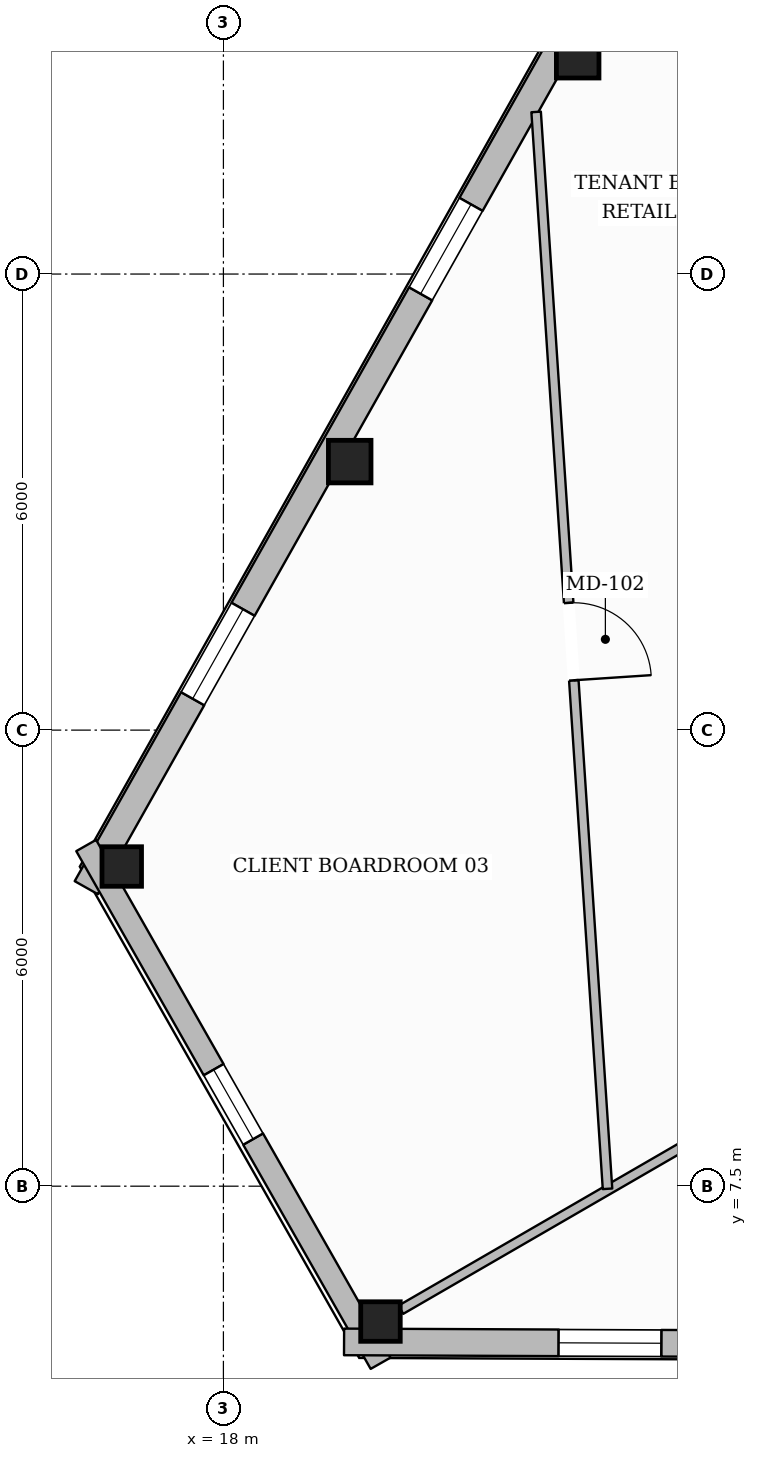
"""IFC4 building model, lengths in metres.
Left out: names, types, materials, properties, quantities, classifications, styles, units other than length and angle.
Written with IfcOpenShell. Run it as: python <this file> out.ifc"""

import sys

from ifc_helpers import new_model, si_unit, direction, frame, frame_2d, origin, origin_2d, place, context, subcontext, project, spatial, rectangle, hollow_rectangle, extrude, element, fill, save


model = new_model("IFC4")
c1 = context("Model", 3, precision=1e-05, world=origin(), true_north=direction((0.0, 1.0)))
c2 = subcontext(c1, "Body", "Model", "MODEL_VIEW")
j1 = project(units=[si_unit("LENGTHUNIT", "METRE"), si_unit("PLANEANGLEUNIT", "RADIAN")], contexts=[c1])
p1 = place(None, origin())
s1 = spatial("IfcSite", under=j1, at=p1, CompositionType="ELEMENT")
p2 = place(p1, origin())
s2 = spatial("IfcBuilding", under=s1, at=p2, CompositionType="ELEMENT")
p3 = place(p2, frame((0.0, 0.0, 239.5)))
s3 = spatial("IfcBuildingStorey", under=s2, at=p3, CompositionType="ELEMENT", Elevation=239.5)
for number, where, z_axis, x_axis in (
    (1, (22.661, 22.359, 0.0), (0.0, 0.0, 1.0), (1.0, 0.0, 0.0)),
    (2, (19.662, 17.032, 0.0), (0.0, 0.0, 1.0), (1.0, 0.0, 0.0)),
):
    element("IfcColumn", number, at=place(p3, frame(where, z_axis=z_axis, x_axis=x_axis)), inside=s3, PredefinedType="COLUMN", context=c2, shape_type="SweptSolid", body=[
        extrude(hollow_rectangle(XDim=0.56, YDim=0.56, WallThickness=0.025, at=origin_2d()), origin(), (0.0, 0.0, 1.0), 3.61),
    ])
for number, where, z_axis, x_axis in (
    (3, (16.663, 11.706, 0.0), (0.0, 0.0, 1.0), (1.0, 0.0, 0.0)),
    (4, (20.066, 5.719, 0.0), (0.0, 0.0, 1.0), (1.0, 0.0, 0.0)),
):
    element("IfcColumn", number, at=place(p3, frame(where, z_axis=z_axis, x_axis=x_axis)), inside=s3, PredefinedType="COLUMN", context=c2, shape_type="SweptSolid", body=[
        extrude(hollow_rectangle(XDim=0.52, YDim=0.52, WallThickness=0.024, at=origin_2d()), origin(), (0.0, 0.0, 1.0), 3.61),
    ])
p4 = place(p3, frame((16.196, 11.427, 0.0), z_axis=(0.0, 0.0, 1.0), x_axis=(0.490622807514, 0.871372056442, 0.0)))
e5 = element("IfcWall", 5, at=p4, inside=s3, PredefinedType="STANDARD", context=c2, shape_type="SweptSolid", body=[
    extrude(rectangle(XDim=37.632, YDim=0.35, at=frame_2d((18.816, 0.0))), origin(), (0.0, 0.0, 1.0), 3.196),
])
p5 = place(p4, frame((27.624, 0.0, 0.0)))
e6 = element("IfcOpeningElement", 6, at=p5, cuts=e5, PredefinedType="OPENING", context=c2, shape_type="SweptSolid", body=[
    extrude(rectangle(XDim=1.0, YDim=2.2, at=frame_2d((0.5, 1.1))), frame((0.0, 0.185, 0.0), z_axis=(0.0, -1.0, 0.0), x_axis=(1.0, 0.0, 0.0)), (0.0, 0.0, 1.0), 0.37),
])
p6 = place(p4, frame((33.418, 0.0, 0.65)))
e7 = element("IfcOpeningElement", 7, at=p6, cuts=e5, PredefinedType="OPENING", context=c2, shape_type="SweptSolid", body=[
    extrude(rectangle(XDim=1.35, YDim=1.75, at=frame_2d((0.675, 0.875))), frame((0.0, 0.185, 0.0), z_axis=(0.0, -1.0, 0.0), x_axis=(1.0, 0.0, 0.0)), (0.0, 0.0, 1.0), 0.37),
])
p7 = place(p4, frame((21.192, 0.0, 0.65)))
e8 = element("IfcOpeningElement", 8, at=p7, cuts=e5, PredefinedType="OPENING", context=c2, shape_type="SweptSolid", body=[
    extrude(rectangle(XDim=1.35, YDim=1.75, at=frame_2d((0.675, 0.875))), frame((0.0, 0.185, 0.0), z_axis=(0.0, -1.0, 0.0), x_axis=(1.0, 0.0, 0.0)), (0.0, 0.0, 1.0), 0.37),
])
p8 = place(p4, frame((8.966, 0.0, 0.65)))
e9 = element("IfcOpeningElement", 9, at=p8, cuts=e5, PredefinedType="OPENING", context=c2, shape_type="SweptSolid", body=[
    extrude(rectangle(XDim=1.35, YDim=1.75, at=frame_2d((0.675, 0.875))), frame((0.0, 0.185, 0.0), z_axis=(0.0, -1.0, 0.0), x_axis=(1.0, 0.0, 0.0)), (0.0, 0.0, 1.0), 0.37),
])
p9 = place(p4, frame((2.853, 0.0, 0.65)))
e10 = element("IfcOpeningElement", 10, at=p9, cuts=e5, PredefinedType="OPENING", context=c2, shape_type="SweptSolid", body=[
    extrude(rectangle(XDim=1.35, YDim=1.75, at=frame_2d((0.675, 0.875))), frame((0.0, 0.185, 0.0), z_axis=(0.0, -1.0, 0.0), x_axis=(1.0, 0.0, 0.0)), (0.0, 0.0, 1.0), 0.37),
])
p10 = place(p3, frame((20.068, 5.17, 0.0), z_axis=(0.0, 0.0, 1.0), x_axis=(-0.494295761475, 0.869293793943, 0.0)))
e11 = element("IfcWall", 11, at=p10, inside=s3, PredefinedType="STANDARD", context=c2, shape_type="SweptSolid", body=[
    extrude(rectangle(XDim=7.836, YDim=0.3, at=frame_2d((3.918, 0.0))), origin(), (0.0, 0.0, 1.0), 3.196),
])
p11 = place(p10, frame((3.393, 0.0, 0.65)))
e12 = element("IfcOpeningElement", 12, at=p11, cuts=e11, PredefinedType="OPENING", context=c2, shape_type="SweptSolid", body=[
    extrude(rectangle(XDim=1.05, YDim=1.7, at=frame_2d((0.525, 0.85))), frame((0.0, 0.16, 0.0), z_axis=(0.0, -1.0, 0.0), x_axis=(1.0, 0.0, 0.0)), (0.0, 0.0, 1.0), 0.32),
])
p12 = place(p3, frame((56.79, 5.294, 0.0), z_axis=(0.0, 0.0, 1.0), x_axis=(-0.999991124913, 0.004213086292, 0.0)))
e13 = element("IfcWall", 13, at=p12, inside=s3, PredefinedType="STANDARD", context=c2, shape_type="SweptSolid", body=[
    extrude(rectangle(XDim=37.203, YDim=0.35, at=frame_2d((18.601, 0.0))), origin(), (0.0, 0.0, 1.0), 3.196),
])
p13 = place(p12, frame((27.302, 0.0, 0.0)))
e14 = element("IfcOpeningElement", 14, at=p13, cuts=e13, PredefinedType="OPENING", context=c2, shape_type="SweptSolid", body=[
    extrude(rectangle(XDim=1.0, YDim=2.2, at=frame_2d((0.5, 1.1))), frame((0.0, 0.185, 0.0), z_axis=(0.0, -1.0, 0.0), x_axis=(1.0, 0.0, 0.0)), (0.0, 0.0, 1.0), 0.37),
])
p14 = place(p12, frame((33.03, 0.0, 0.65)))
e15 = element("IfcOpeningElement", 15, at=p14, cuts=e13, PredefinedType="OPENING", context=c2, shape_type="SweptSolid", body=[
    extrude(rectangle(XDim=1.35, YDim=1.75, at=frame_2d((0.675, 0.875))), frame((0.0, 0.185, 0.0), z_axis=(0.0, -1.0, 0.0), x_axis=(1.0, 0.0, 0.0)), (0.0, 0.0, 1.0), 0.37),
])
p15 = place(p12, frame((20.948, 0.0, 0.65)))
e16 = element("IfcOpeningElement", 16, at=p15, cuts=e13, PredefinedType="OPENING", context=c2, shape_type="SweptSolid", body=[
    extrude(rectangle(XDim=1.35, YDim=1.75, at=frame_2d((0.675, 0.875))), frame((0.0, 0.185, 0.0), z_axis=(0.0, -1.0, 0.0), x_axis=(1.0, 0.0, 0.0)), (0.0, 0.0, 1.0), 0.37),
])
p16 = place(p12, frame((8.868, 0.0, 0.65)))
e17 = element("IfcOpeningElement", 17, at=p16, cuts=e13, PredefinedType="OPENING", context=c2, shape_type="SweptSolid", body=[
    extrude(rectangle(XDim=1.35, YDim=1.75, at=frame_2d((0.675, 0.875))), frame((0.0, 0.185, 0.0), z_axis=(0.0, -1.0, 0.0), x_axis=(1.0, 0.0, 0.0)), (0.0, 0.0, 1.0), 0.37),
])
p17 = place(p12, frame((2.827, 0.0, 0.65)))
e18 = element("IfcOpeningElement", 18, at=p17, cuts=e13, PredefinedType="OPENING", context=c2, shape_type="SweptSolid", body=[
    extrude(rectangle(XDim=1.35, YDim=1.75, at=frame_2d((0.675, 0.875))), frame((0.0, 0.185, 0.0), z_axis=(0.0, -1.0, 0.0), x_axis=(1.0, 0.0, 0.0)), (0.0, 0.0, 1.0), 0.37),
])
p18 = place(p3, frame((26.01, 9.159, 0.0), z_axis=(0.0, 0.0, 1.0), x_axis=(-0.865468767554, -0.500962885241, 0.0)))
e19 = element("IfcWall", 19, at=p18, inside=s3, PredefinedType="PARTITIONING", context=c2, shape_type="SweptSolid", body=[
    extrude(rectangle(XDim=6.557, YDim=0.125, at=frame_2d((3.279, 0.0))), origin(), (0.0, 0.0, 1.0), 3.246),
])
p19 = place(p3, frame((22.114, 21.633, 0.0), z_axis=(0.0, 0.0, 1.0), x_axis=(0.06614923697, -0.997809740606, 0.0)))
e20 = element("IfcWall", 20, at=p19, inside=s3, PredefinedType="PARTITIONING", context=c2, shape_type="SweptSolid", body=[
    extrude(rectangle(XDim=14.198, YDim=0.125, at=frame_2d((7.099, 0.0))), origin(), (0.0, 0.0, 1.0), 3.349),
])
p20 = place(p19, frame((6.473, 0.0, 0.0)))
e21 = element("IfcOpeningElement", 21, at=p20, cuts=e20, PredefinedType="OPENING", context=c2, shape_type="SweptSolid", body=[
    extrude(rectangle(XDim=1.02, YDim=2.15, at=frame_2d((0.51, 1.075))), frame((0.0, 0.073, 0.0), z_axis=(0.0, -1.0, 0.0), x_axis=(1.0, 0.0, 0.0)), (0.0, 0.0, 1.0), 0.145),
])
p21 = place(p8, origin())
e22 = element("IfcWindow", 22, at=p21, inside=s3, PartitioningType="SINGLE_PANEL", PredefinedType="WINDOW", context=c2, shape_type="SweptSolid", body=[
    extrude(rectangle(XDim=1.35, YDim=1.75, at=frame_2d((0.675, 0.875))), frame((0.0, 0.03, 0.0), z_axis=(0.0, -1.0, 0.0), x_axis=(1.0, 0.0, 0.0)), (0.0, 0.0, 1.0), 0.06),
])
fill(e9, e22)
p22 = place(p9, origin())
e23 = element("IfcWindow", 23, at=p22, inside=s3, PartitioningType="SINGLE_PANEL", PredefinedType="WINDOW", context=c2, shape_type="SweptSolid", body=[
    extrude(rectangle(XDim=1.35, YDim=1.75, at=frame_2d((0.675, 0.875))), frame((0.0, 0.03, 0.0), z_axis=(0.0, -1.0, 0.0), x_axis=(1.0, 0.0, 0.0)), (0.0, 0.0, 1.0), 0.06),
])
fill(e10, e23)
p23 = place(p14, origin())
e24 = element("IfcWindow", 24, at=p23, inside=s3, PartitioningType="SINGLE_PANEL", PredefinedType="WINDOW", context=c2, shape_type="SweptSolid", body=[
    extrude(rectangle(XDim=1.35, YDim=1.75, at=frame_2d((0.675, 0.875))), frame((0.0, 0.03, 0.0), z_axis=(0.0, -1.0, 0.0), x_axis=(1.0, 0.0, 0.0)), (0.0, 0.0, 1.0), 0.06),
])
fill(e15, e24)
p24 = place(p11, origin())
e25 = element("IfcWindow", 25, at=p24, inside=s3, PartitioningType="SINGLE_PANEL", PredefinedType="WINDOW", context=c2, shape_type="SweptSolid", body=[
    extrude(rectangle(XDim=1.05, YDim=1.7, at=frame_2d((0.525, 0.85))), frame((0.0, 0.03, 0.0), z_axis=(0.0, -1.0, 0.0), x_axis=(1.0, 0.0, 0.0)), (0.0, 0.0, 1.0), 0.06),
])
fill(e12, e25)
p25 = place(p20, origin())
e26 = element("IfcDoor", 26, at=p25, inside=s3, OperationType="SINGLE_SWING_RIGHT", PredefinedType="DOOR", context=c2, shape_type="SweptSolid", body=[
    extrude(rectangle(XDim=1.02, YDim=2.15, at=frame_2d((0.51, 1.075))), frame((0.0, 0.025, 0.0), z_axis=(0.0, -1.0, 0.0), x_axis=(1.0, 0.0, 0.0)), (0.0, 0.0, 1.0), 0.05),
])
fill(e21, e26)
save(model, sys.argv[1])
